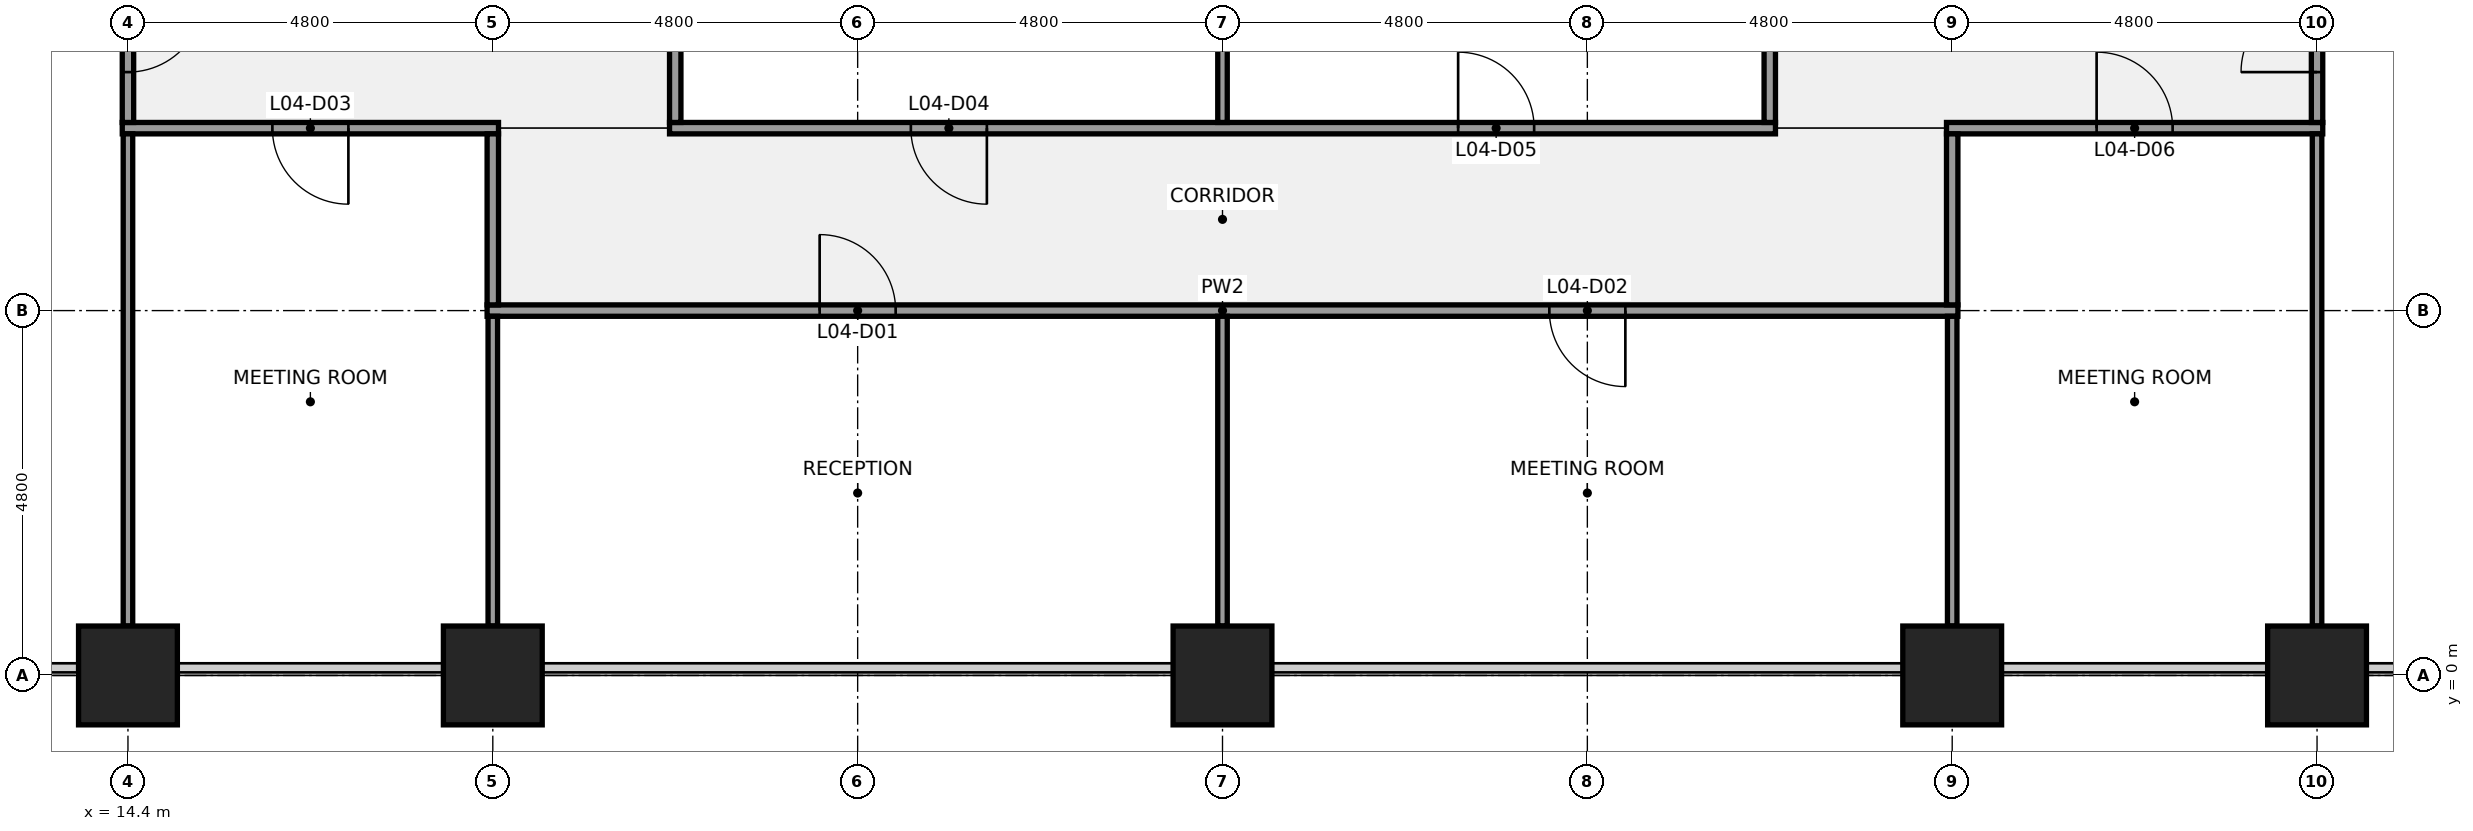
"""IFC4 building model, lengths in metres.
Left out: names, types, materials, properties, quantities, classifications, styles, units other than length and angle.
Written with IfcOpenShell. Run it as: python <this file> out.ifc"""

import sys

from ifc_helpers import new_model, si_unit, direction, frame, frame_2d, origin, origin_2d, place, context, subcontext, project, spatial, rectangle, extrude, element, fill, save


model = new_model("IFC4")
c1 = context("Model", 3, precision=1e-05, world=origin(), true_north=direction((0.0, 1.0)))
c2 = subcontext(c1, "Body", "Model", "MODEL_VIEW")
j1 = project(units=[si_unit("LENGTHUNIT", "METRE"), si_unit("PLANEANGLEUNIT", "RADIAN")], contexts=[c1])
p1 = place(None, origin())
s1 = spatial("IfcSite", under=j1, at=p1, CompositionType="ELEMENT")
p2 = place(p1, origin())
s2 = spatial("IfcBuilding", under=s1, at=p2, CompositionType="ELEMENT")
p3 = place(p2, frame((0.0, 0.0, 25.8)))
s3 = spatial("IfcBuildingStorey", under=s2, at=p3, CompositionType="ELEMENT", Elevation=25.8)
for number, where, z_axis, x_axis in (
    (1, (14.4, 0.0, 0.0), (0.0, 0.0, 1.0), (1.0, 0.0, 0.0)),
    (2, (19.2, 0.0, 0.0), (0.0, 0.0, 1.0), (1.0, 0.0, 0.0)),
    (3, (28.8, 0.0, 0.0), (0.0, 0.0, 1.0), (1.0, 0.0, 0.0)),
    (4, (38.4, 0.0, 0.0), (0.0, 0.0, 1.0), (1.0, 0.0, 0.0)),
    (5, (43.2, 0.0, 0.0), (0.0, 0.0, 1.0), (1.0, 0.0, 0.0)),
):
    element("IfcColumn", number, at=place(p3, frame(where, z_axis=z_axis, x_axis=x_axis)), inside=s3, PredefinedType="COLUMN", context=c2, shape_type="SweptSolid", body=[
        extrude(rectangle(XDim=1.3, YDim=1.3, at=origin_2d()), origin(), (0.0, 0.0, 1.0), 4.4),
    ])
p4 = place(p3, frame((19.125, 4.8, 0.0), z_axis=(0.0, 0.0, 1.0), x_axis=(1.0, 0.0, 0.0)))
e6 = element("IfcWall", 6, at=p4, inside=s3, PredefinedType="PARTITIONING", context=c2, shape_type="SweptSolid", body=[
    extrude(rectangle(XDim=19.35, YDim=0.15, at=frame_2d((9.675, 0.0))), origin(), (0.0, 0.0, 1.0), 3.27),
])
p5 = place(p4, frame((4.375, 0.0, 0.0)))
e7 = element("IfcOpeningElement", 7, at=p5, cuts=e6, PredefinedType="OPENING", context=c2, shape_type="SweptSolid", body=[
    extrude(rectangle(XDim=1.0, YDim=2.1, at=frame_2d((0.5, 1.05))), frame((0.0, 0.085, 0.0), z_axis=(0.0, -1.0, 0.0), x_axis=(1.0, 0.0, 0.0)), (0.0, 0.0, 1.0), 0.17),
])
p6 = place(p4, frame((13.975, 0.0, 0.0)))
e8 = element("IfcOpeningElement", 8, at=p6, cuts=e6, PredefinedType="OPENING", context=c2, shape_type="SweptSolid", body=[
    extrude(rectangle(XDim=1.0, YDim=2.1, at=frame_2d((0.5, 1.05))), frame((0.0, 0.085, 0.0), z_axis=(0.0, -1.0, 0.0), x_axis=(1.0, 0.0, 0.0)), (0.0, 0.0, 1.0), 0.17),
])
p7 = place(p3, frame((14.325, 7.2, 0.0), z_axis=(0.0, 0.0, 1.0), x_axis=(1.0, 0.0, 0.0)))
e9 = element("IfcWall", 9, at=p7, inside=s3, PredefinedType="PARTITIONING", context=c2, shape_type="SweptSolid", body=[
    extrude(rectangle(XDim=4.95, YDim=0.15, at=frame_2d((2.475, 0.0))), origin(), (0.0, 0.0, 1.0), 3.27),
])
p8 = place(p7, frame((1.975, 0.0, 0.0)))
e10 = element("IfcOpeningElement", 10, at=p8, cuts=e9, PredefinedType="OPENING", context=c2, shape_type="SweptSolid", body=[
    extrude(rectangle(XDim=1.0, YDim=2.1, at=frame_2d((0.5, 1.05))), frame((0.0, 0.085, 0.0), z_axis=(0.0, -1.0, 0.0), x_axis=(1.0, 0.0, 0.0)), (0.0, 0.0, 1.0), 0.17),
])
p9 = place(p3, frame((21.525, 7.2, 0.0), z_axis=(0.0, 0.0, 1.0), x_axis=(1.0, 0.0, 0.0)))
e11 = element("IfcWall", 11, at=p9, inside=s3, PredefinedType="PARTITIONING", context=c2, shape_type="SweptSolid", body=[
    extrude(rectangle(XDim=14.55, YDim=0.15, at=frame_2d((7.275, 0.0))), origin(), (0.0, 0.0, 1.0), 3.27),
])
p10 = place(p9, frame((3.175, 0.0, 0.0)))
e12 = element("IfcOpeningElement", 12, at=p10, cuts=e11, PredefinedType="OPENING", context=c2, shape_type="SweptSolid", body=[
    extrude(rectangle(XDim=1.0, YDim=2.1, at=frame_2d((0.5, 1.05))), frame((0.0, 0.085, 0.0), z_axis=(0.0, -1.0, 0.0), x_axis=(1.0, 0.0, 0.0)), (0.0, 0.0, 1.0), 0.17),
])
p11 = place(p9, frame((10.375, 0.0, 0.0)))
e13 = element("IfcOpeningElement", 13, at=p11, cuts=e11, PredefinedType="OPENING", context=c2, shape_type="SweptSolid", body=[
    extrude(rectangle(XDim=1.0, YDim=2.1, at=frame_2d((0.5, 1.05))), frame((0.0, 0.085, 0.0), z_axis=(0.0, -1.0, 0.0), x_axis=(1.0, 0.0, 0.0)), (0.0, 0.0, 1.0), 0.17),
])
p12 = place(p3, frame((38.325, 7.2, 0.0), z_axis=(0.0, 0.0, 1.0), x_axis=(1.0, 0.0, 0.0)))
e14 = element("IfcWall", 14, at=p12, inside=s3, PredefinedType="PARTITIONING", context=c2, shape_type="SweptSolid", body=[
    extrude(rectangle(XDim=4.95, YDim=0.15, at=frame_2d((2.475, 0.0))), origin(), (0.0, 0.0, 1.0), 3.27),
])
p13 = place(p12, frame((1.975, 0.0, 0.0)))
e15 = element("IfcOpeningElement", 15, at=p13, cuts=e14, PredefinedType="OPENING", context=c2, shape_type="SweptSolid", body=[
    extrude(rectangle(XDim=1.0, YDim=2.1, at=frame_2d((0.5, 1.05))), frame((0.0, 0.085, 0.0), z_axis=(0.0, -1.0, 0.0), x_axis=(1.0, 0.0, 0.0)), (0.0, 0.0, 1.0), 0.17),
])
p14 = place(p3, frame((14.4, 0.65, 0.0), z_axis=(0.0, 0.0, 1.0), x_axis=(0.0, 1.0, 0.0)))
e16 = element("IfcWall", 16, at=p14, inside=s3, PredefinedType="PARTITIONING", context=c2, shape_type="SweptSolid", body=[
    extrude(rectangle(XDim=6.475, YDim=0.125, at=frame_2d((3.238, 0.0))), origin(), (0.0, 0.0, 1.0), 3.27),
])
p15 = place(p3, frame((14.4, 7.275, 0.0), z_axis=(0.0, 0.0, 1.0), x_axis=(0.0, 1.0, 0.0)))
e17 = element("IfcWall", 17, at=p15, inside=s3, PredefinedType="PARTITIONING", context=c2, shape_type="SweptSolid", body=[
    extrude(rectangle(XDim=2.325, YDim=0.15, at=frame_2d((1.163, 0.0))), origin(), (0.0, 0.0, 1.0), 3.27),
])
p16 = place(p15, frame((0.663, 0.0, 0.0)))
e18 = element("IfcOpeningElement", 18, at=p16, cuts=e17, PredefinedType="OPENING", context=c2, shape_type="SweptSolid", body=[
    extrude(rectangle(XDim=1.0, YDim=2.1, at=frame_2d((0.5, 1.05))), frame((0.0, 0.085, 0.0), z_axis=(0.0, -1.0, 0.0), x_axis=(1.0, 0.0, 0.0)), (0.0, 0.0, 1.0), 0.17),
])
p17 = place(p3, frame((19.2, 0.65, 0.0), z_axis=(0.0, 0.0, 1.0), x_axis=(0.0, 1.0, 0.0)))
e19 = element("IfcWall", 19, at=p17, inside=s3, PredefinedType="PARTITIONING", context=c2, shape_type="SweptSolid", body=[
    extrude(rectangle(XDim=4.075, YDim=0.125, at=frame_2d((2.038, 0.0))), origin(), (0.0, 0.0, 1.0), 3.27),
])
p18 = place(p3, frame((19.2, 4.875, 0.0), z_axis=(0.0, 0.0, 1.0), x_axis=(0.0, 1.0, 0.0)))
e20 = element("IfcWall", 20, at=p18, inside=s3, PredefinedType="PARTITIONING", context=c2, shape_type="SweptSolid", body=[
    extrude(rectangle(XDim=2.25, YDim=0.15, at=frame_2d((1.125, 0.0))), origin(), (0.0, 0.0, 1.0), 3.27),
])
p19 = place(p3, frame((21.6, 7.275, 0.0), z_axis=(0.0, 0.0, 1.0), x_axis=(0.0, 1.0, 0.0)))
e21 = element("IfcWall", 21, at=p19, inside=s3, PredefinedType="PARTITIONING", context=c2, shape_type="SweptSolid", body=[
    extrude(rectangle(XDim=2.263, YDim=0.15, at=frame_2d((1.131, 0.0))), origin(), (0.0, 0.0, 1.0), 3.27),
])
p20 = place(p3, frame((28.8, 0.65, 0.0), z_axis=(0.0, 0.0, 1.0), x_axis=(0.0, 1.0, 0.0)))
e22 = element("IfcWall", 22, at=p20, inside=s3, PredefinedType="PARTITIONING", context=c2, shape_type="SweptSolid", body=[
    extrude(rectangle(XDim=4.075, YDim=0.125, at=frame_2d((2.038, 0.0))), origin(), (0.0, 0.0, 1.0), 3.27),
])
p21 = place(p3, frame((28.8, 7.275, 0.0), z_axis=(0.0, 0.0, 1.0), x_axis=(0.0, 1.0, 0.0)))
e23 = element("IfcWall", 23, at=p21, inside=s3, PredefinedType="PARTITIONING", context=c2, shape_type="SweptSolid", body=[
    extrude(rectangle(XDim=2.263, YDim=0.125, at=frame_2d((1.131, 0.0))), origin(), (0.0, 0.0, 1.0), 3.27),
])
p22 = place(p3, frame((36.0, 7.275, 0.0), z_axis=(0.0, 0.0, 1.0), x_axis=(0.0, 1.0, 0.0)))
e24 = element("IfcWall", 24, at=p22, inside=s3, PredefinedType="PARTITIONING", context=c2, shape_type="SweptSolid", body=[
    extrude(rectangle(XDim=2.263, YDim=0.15, at=frame_2d((1.131, 0.0))), origin(), (0.0, 0.0, 1.0), 3.27),
])
p23 = place(p3, frame((38.4, 0.65, 0.0), z_axis=(0.0, 0.0, 1.0), x_axis=(0.0, 1.0, 0.0)))
e25 = element("IfcWall", 25, at=p23, inside=s3, PredefinedType="PARTITIONING", context=c2, shape_type="SweptSolid", body=[
    extrude(rectangle(XDim=4.075, YDim=0.125, at=frame_2d((2.038, 0.0))), origin(), (0.0, 0.0, 1.0), 3.27),
])
p24 = place(p3, frame((38.4, 4.875, 0.0), z_axis=(0.0, 0.0, 1.0), x_axis=(0.0, 1.0, 0.0)))
e26 = element("IfcWall", 26, at=p24, inside=s3, PredefinedType="PARTITIONING", context=c2, shape_type="SweptSolid", body=[
    extrude(rectangle(XDim=2.25, YDim=0.15, at=frame_2d((1.125, 0.0))), origin(), (0.0, 0.0, 1.0), 3.27),
])
p25 = place(p3, frame((43.2, 0.65, 0.0), z_axis=(0.0, 0.0, 1.0), x_axis=(0.0, 1.0, 0.0)))
e27 = element("IfcWall", 27, at=p25, inside=s3, PredefinedType="PARTITIONING", context=c2, shape_type="SweptSolid", body=[
    extrude(rectangle(XDim=6.475, YDim=0.125, at=frame_2d((3.238, 0.0))), origin(), (0.0, 0.0, 1.0), 3.27),
])
p26 = place(p3, frame((43.2, 7.275, 0.0), z_axis=(0.0, 0.0, 1.0), x_axis=(0.0, 1.0, 0.0)))
e28 = element("IfcWall", 28, at=p26, inside=s3, PredefinedType="PARTITIONING", context=c2, shape_type="SweptSolid", body=[
    extrude(rectangle(XDim=2.325, YDim=0.15, at=frame_2d((1.163, 0.0))), origin(), (0.0, 0.0, 1.0), 3.27),
])
p27 = place(p26, frame((0.663, 0.0, 0.0)))
e29 = element("IfcOpeningElement", 29, at=p27, cuts=e28, PredefinedType="OPENING", context=c2, shape_type="SweptSolid", body=[
    extrude(rectangle(XDim=1.0, YDim=2.1, at=frame_2d((0.5, 1.05))), frame((0.0, 0.085, 0.0), z_axis=(0.0, -1.0, 0.0), x_axis=(1.0, 0.0, 0.0)), (0.0, 0.0, 1.0), 0.17),
])
for number, where, z_axis, x_axis in (
    (30, (14.4, -1.075, 0.0), (0.0, 0.0, 1.0), (1.0, 0.0, 0.0)),
    (31, (19.2, -1.075, 0.0), (0.0, 0.0, 1.0), (1.0, 0.0, 0.0)),
    (32, (38.4, -1.075, 0.0), (0.0, 0.0, 1.0), (1.0, 0.0, 0.0)),
    (33, (43.2, -1.075, 0.0), (0.0, 0.0, 1.0), (1.0, 0.0, 0.0)),
):
    element("IfcColumn", number, at=place(p3, frame(where, z_axis=z_axis, x_axis=x_axis)), inside=s3, PredefinedType="PILASTER", context=c2, shape_type="SweptSolid", body=[
        extrude(rectangle(XDim=4.2, YDim=0.85, at=origin_2d()), origin(), (0.0, 0.0, 1.0), 4.4),
    ])
p28 = place(p5, origin())
e34 = element("IfcDoor", 34, at=p28, inside=s3, OperationType="SINGLE_SWING_LEFT", PredefinedType="DOOR", context=c2, shape_type="SweptSolid", body=[
    extrude(rectangle(XDim=1.0, YDim=2.1, at=frame_2d((0.5, 1.05))), frame((0.0, 0.025, 0.0), z_axis=(0.0, -1.0, 0.0), x_axis=(1.0, 0.0, 0.0)), (0.0, 0.0, 1.0), 0.05),
])
fill(e7, e34)
p29 = place(p6, origin())
e35 = element("IfcDoor", 35, at=p29, inside=s3, OperationType="SINGLE_SWING_RIGHT", PredefinedType="DOOR", context=c2, shape_type="SweptSolid", body=[
    extrude(rectangle(XDim=1.0, YDim=2.1, at=frame_2d((0.5, 1.05))), frame((0.0, 0.025, 0.0), z_axis=(0.0, -1.0, 0.0), x_axis=(1.0, 0.0, 0.0)), (0.0, 0.0, 1.0), 0.05),
])
fill(e8, e35)
p30 = place(p8, origin())
e36 = element("IfcDoor", 36, at=p30, inside=s3, OperationType="SINGLE_SWING_RIGHT", PredefinedType="DOOR", context=c2, shape_type="SweptSolid", body=[
    extrude(rectangle(XDim=1.0, YDim=2.1, at=frame_2d((0.5, 1.05))), frame((0.0, 0.025, 0.0), z_axis=(0.0, -1.0, 0.0), x_axis=(1.0, 0.0, 0.0)), (0.0, 0.0, 1.0), 0.05),
])
fill(e10, e36)
p31 = place(p10, origin())
e37 = element("IfcDoor", 37, at=p31, inside=s3, OperationType="SINGLE_SWING_RIGHT", PredefinedType="DOOR", context=c2, shape_type="SweptSolid", body=[
    extrude(rectangle(XDim=1.0, YDim=2.1, at=frame_2d((0.5, 1.05))), frame((0.0, 0.025, 0.0), z_axis=(0.0, -1.0, 0.0), x_axis=(1.0, 0.0, 0.0)), (0.0, 0.0, 1.0), 0.05),
])
fill(e12, e37)
p32 = place(p11, origin())
e38 = element("IfcDoor", 38, at=p32, inside=s3, OperationType="SINGLE_SWING_LEFT", PredefinedType="DOOR", context=c2, shape_type="SweptSolid", body=[
    extrude(rectangle(XDim=1.0, YDim=2.1, at=frame_2d((0.5, 1.05))), frame((0.0, 0.025, 0.0), z_axis=(0.0, -1.0, 0.0), x_axis=(1.0, 0.0, 0.0)), (0.0, 0.0, 1.0), 0.05),
])
fill(e13, e38)
p33 = place(p13, origin())
e39 = element("IfcDoor", 39, at=p33, inside=s3, OperationType="SINGLE_SWING_LEFT", PredefinedType="DOOR", context=c2, shape_type="SweptSolid", body=[
    extrude(rectangle(XDim=1.0, YDim=2.1, at=frame_2d((0.5, 1.05))), frame((0.0, 0.025, 0.0), z_axis=(0.0, -1.0, 0.0), x_axis=(1.0, 0.0, 0.0)), (0.0, 0.0, 1.0), 0.05),
])
fill(e15, e39)
p34 = place(p16, origin())
e40 = element("IfcDoor", 40, at=p34, inside=s3, OperationType="SINGLE_SWING_RIGHT", PredefinedType="DOOR", context=c2, shape_type="SweptSolid", body=[
    extrude(rectangle(XDim=1.0, YDim=2.1, at=frame_2d((0.5, 1.05))), frame((0.0, 0.025, 0.0), z_axis=(0.0, -1.0, 0.0), x_axis=(1.0, 0.0, 0.0)), (0.0, 0.0, 1.0), 0.05),
])
fill(e18, e40)
p35 = place(p27, origin())
e41 = element("IfcDoor", 41, at=p35, inside=s3, OperationType="SINGLE_SWING_LEFT", PredefinedType="DOOR", context=c2, shape_type="SweptSolid", body=[
    extrude(rectangle(XDim=1.0, YDim=2.1, at=frame_2d((0.5, 1.05))), frame((0.0, 0.025, 0.0), z_axis=(0.0, -1.0, 0.0), x_axis=(1.0, 0.0, 0.0)), (0.0, 0.0, 1.0), 0.05),
])
fill(e29, e41)
save(model, sys.argv[1])
